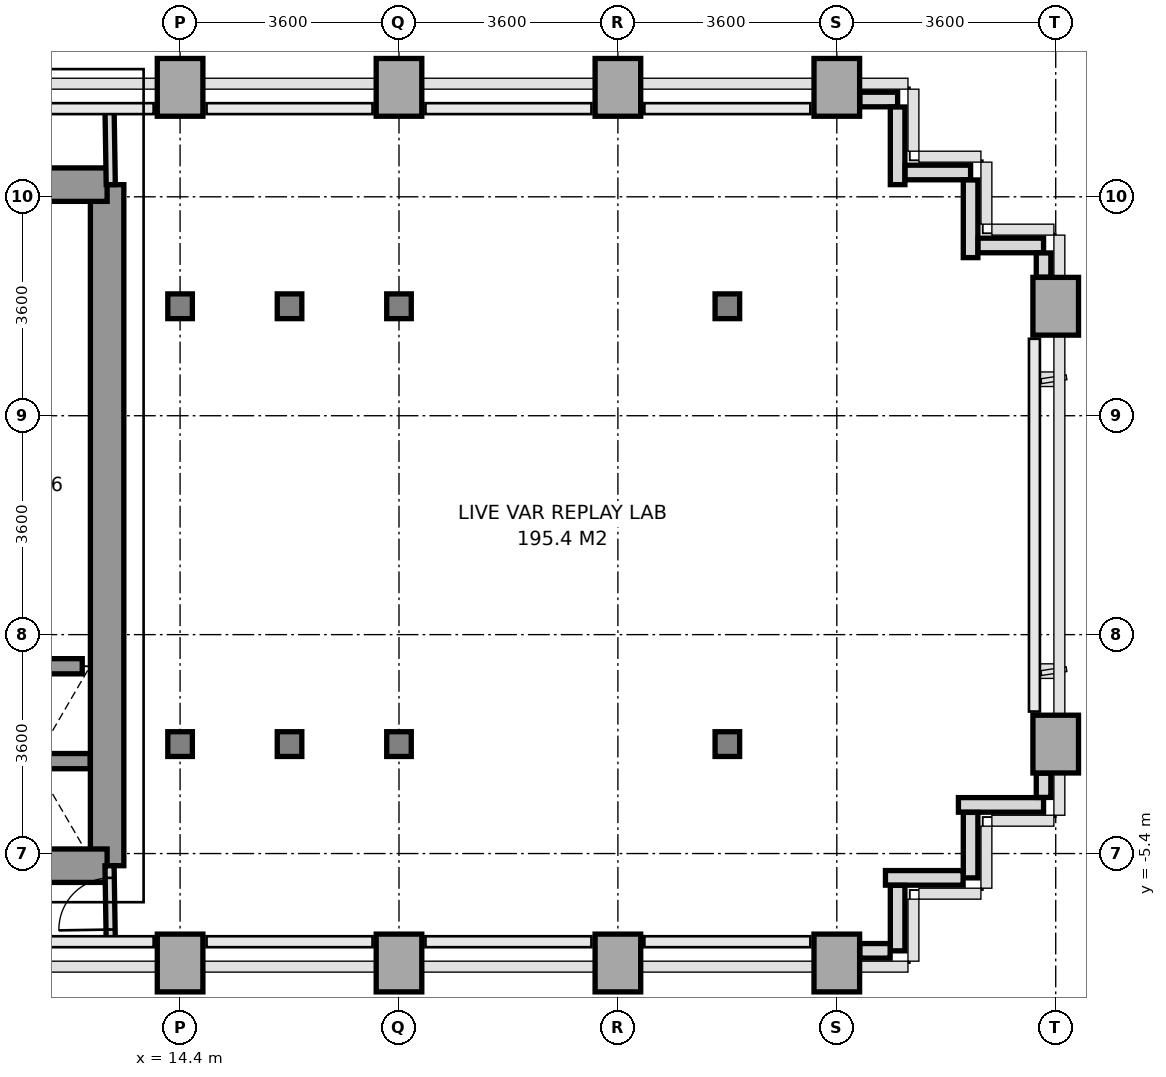
"""IFC4 building model, lengths in metres.
Left out: names, types, materials, properties, quantities, classifications, styles, units other than length and angle.
Written with IfcOpenShell. Run it as: python <this file> out.ifc"""

import sys

from ifc_helpers import new_model, si_unit, direction, frame, frame_2d, origin, origin_2d, place, context, subcontext, project, spatial, rectangle, i_section, extrude, source, transform, mapped, element, fill, save


model = new_model("IFC4")
c1 = context("Model", 3, precision=1e-05, world=origin(), true_north=direction((0.0, 1.0)))
c2 = subcontext(c1, "Body", "Model", "MODEL_VIEW")
j1 = project(units=[si_unit("LENGTHUNIT", "METRE"), si_unit("PLANEANGLEUNIT", "RADIAN")], contexts=[c1])
p1 = place(None, origin())
s1 = spatial("IfcSite", under=j1, at=p1, CompositionType="ELEMENT")
p2 = place(p1, origin())
s2 = spatial("IfcBuilding", under=s1, at=p2, CompositionType="ELEMENT")
p3 = place(p2, frame((0.0, 0.0, 78.2)))
s3 = spatial("IfcBuildingStorey", under=s2, at=p3, CompositionType="ELEMENT", Elevation=78.2)
m1 = source(origin(), c2, "Body", "SweptSolid", [
    extrude(rectangle(XDim=0.75, YDim=0.95, at=origin_2d()), origin(), (0.0, 0.0, 1.0), 3.2),
])
p4 = place(p3, frame((14.4, -7.2, 0.0), z_axis=(0.0, 0.0, 1.0), x_axis=(1.0, 0.0, 0.0)))
e1 = element("IfcColumn", 1, at=p4, inside=s3, PredefinedType="COLUMN", context=c2, shape_type="MappedRepresentation", body=[
    mapped(m1, transform((0.0, 0.0, 0.0), x_axis=(1.0, 0.0, 0.0), y_axis=(0.0, 1.0, 0.0), z_axis=(0.0, 0.0, 1.0), scale=1.0)),
])
m2 = source(origin(), c2, "Body", "SweptSolid", [
    extrude(i_section(OverallWidth=0.404, OverallDepth=0.407, WebThickness=0.022, FlangeThickness=0.035, at=origin_2d()), origin(), (0.0, 0.0, 1.0), 3.2),
])
for number, where, z_axis, x_axis in (
    (2, (14.4, -3.6, 0.0), (0.0, 0.0, 1.0), (1.0, 0.0, 0.0)),
    (3, (14.4, 3.6, 0.0), (0.0, 0.0, 1.0), (1.0, 0.0, 0.0)),
):
    element("IfcColumn", number, at=place(p3, frame(where, z_axis=z_axis, x_axis=x_axis)), inside=s3, PredefinedType="COLUMN", context=c2, shape_type="MappedRepresentation", body=[
        mapped(m2, transform((0.0, 0.0, 0.0), x_axis=(1.0, 0.0, 0.0), y_axis=(0.0, 1.0, 0.0), z_axis=(0.0, 0.0, 1.0), scale=1.0)),
    ])
p5 = place(p3, frame((14.4, 7.2, 0.0), z_axis=(0.0, 0.0, 1.0), x_axis=(1.0, 0.0, 0.0)))
e4 = element("IfcColumn", 4, at=p5, inside=s3, PredefinedType="COLUMN", context=c2, shape_type="MappedRepresentation", body=[
    mapped(m1, transform((0.0, 0.0, 0.0), x_axis=(1.0, 0.0, 0.0), y_axis=(0.0, 1.0, 0.0), z_axis=(0.0, 0.0, 1.0), scale=1.0)),
])
for number, where, z_axis, x_axis in (
    (5, (16.2, -3.6, 0.0), (0.0, 0.0, 1.0), (1.0, 0.0, 0.0)),
    (6, (16.2, 3.6, 0.0), (0.0, 0.0, 1.0), (1.0, 0.0, 0.0)),
):
    element("IfcColumn", number, at=place(p3, frame(where, z_axis=z_axis, x_axis=x_axis)), inside=s3, PredefinedType="COLUMN", context=c2, shape_type="MappedRepresentation", body=[
        mapped(m2, transform((0.0, 0.0, 0.0), x_axis=(1.0, 0.0, 0.0), y_axis=(0.0, 1.0, 0.0), z_axis=(0.0, 0.0, 1.0), scale=1.0)),
    ])
p6 = place(p3, frame((18.0, -7.2, 0.0), z_axis=(0.0, 0.0, 1.0), x_axis=(1.0, 0.0, 0.0)))
e7 = element("IfcColumn", 7, at=p6, inside=s3, PredefinedType="COLUMN", context=c2, shape_type="MappedRepresentation", body=[
    mapped(m1, transform((0.0, 0.0, 0.0), x_axis=(1.0, 0.0, 0.0), y_axis=(0.0, 1.0, 0.0), z_axis=(0.0, 0.0, 1.0), scale=1.0)),
])
for number, where, z_axis, x_axis in (
    (8, (18.0, -3.6, 0.0), (0.0, 0.0, 1.0), (1.0, 0.0, 0.0)),
    (9, (18.0, 3.6, 0.0), (0.0, 0.0, 1.0), (1.0, 0.0, 0.0)),
):
    element("IfcColumn", number, at=place(p3, frame(where, z_axis=z_axis, x_axis=x_axis)), inside=s3, PredefinedType="COLUMN", context=c2, shape_type="MappedRepresentation", body=[
        mapped(m2, transform((0.0, 0.0, 0.0), x_axis=(1.0, 0.0, 0.0), y_axis=(0.0, 1.0, 0.0), z_axis=(0.0, 0.0, 1.0), scale=1.0)),
    ])
for number, where, z_axis, x_axis in (
    (10, (18.0, 7.2, 0.0), (0.0, 0.0, 1.0), (1.0, 0.0, 0.0)),
    (11, (21.6, -7.2, 0.0), (0.0, 0.0, 1.0), (1.0, 0.0, 0.0)),
    (12, (21.6, 7.2, 0.0), (0.0, 0.0, 1.0), (1.0, 0.0, 0.0)),
):
    element("IfcColumn", number, at=place(p3, frame(where, z_axis=z_axis, x_axis=x_axis)), inside=s3, PredefinedType="COLUMN", context=c2, shape_type="MappedRepresentation", body=[
        mapped(m1, transform((0.0, 0.0, 0.0), x_axis=(1.0, 0.0, 0.0), y_axis=(0.0, 1.0, 0.0), z_axis=(0.0, 0.0, 1.0), scale=1.0)),
    ])
for number, where, z_axis, x_axis in (
    (13, (23.4, -3.6, 0.0), (0.0, 0.0, 1.0), (1.0, 0.0, 0.0)),
    (14, (23.4, 3.6, 0.0), (0.0, 0.0, 1.0), (1.0, 0.0, 0.0)),
):
    element("IfcColumn", number, at=place(p3, frame(where, z_axis=z_axis, x_axis=x_axis)), inside=s3, PredefinedType="COLUMN", context=c2, shape_type="MappedRepresentation", body=[
        mapped(m2, transform((0.0, 0.0, 0.0), x_axis=(1.0, 0.0, 0.0), y_axis=(0.0, 1.0, 0.0), z_axis=(0.0, 0.0, 1.0), scale=1.0)),
    ])
for number, where, z_axis, x_axis in (
    (15, (25.2, -7.2, 0.0), (0.0, 0.0, 1.0), (1.0, 0.0, 0.0)),
    (16, (25.2, 7.2, 0.0), (0.0, 0.0, 1.0), (1.0, 0.0, 0.0)),
    (17, (28.8, -3.6, 0.0), (0.0, 0.0, 1.0), (1.0, 0.0, 0.0)),
    (18, (28.8, 3.6, 0.0), (0.0, 0.0, 1.0), (1.0, 0.0, 0.0)),
):
    element("IfcColumn", number, at=place(p3, frame(where, z_axis=z_axis, x_axis=x_axis)), inside=s3, PredefinedType="COLUMN", context=c2, shape_type="MappedRepresentation", body=[
        mapped(m1, transform((0.0, 0.0, 0.0), x_axis=(1.0, 0.0, 0.0), y_axis=(0.0, 1.0, 0.0), z_axis=(0.0, 0.0, 1.0), scale=1.0)),
    ])
p7 = place(p3, frame((28.6, -4.6, 0.0), z_axis=(0.0, 0.0, 1.0), x_axis=(-1.0, 0.0, 0.0)))
e19 = element("IfcWall", 19, at=p7, inside=s3, PredefinedType="PARAPET", context=c2, shape_type="SweptSolid", body=[
    extrude(rectangle(XDim=1.4, YDim=0.24, at=frame_2d((0.7, 0.0))), origin(), (0.0, 0.0, 1.0), 1.15),
])
p8 = place(p3, frame((27.4, -4.723, 0.0), z_axis=(0.0, 0.0, 1.0), x_axis=(0.0, -1.0, 0.0)))
e20 = element("IfcWall", 20, at=p8, inside=s3, PredefinedType="PARAPET", context=c2, shape_type="SweptSolid", body=[
    extrude(rectangle(XDim=1.077, YDim=0.24, at=frame_2d((0.539, 0.0))), origin(), (0.0, 0.0, 1.0), 1.15),
])
p9 = place(p3, frame((27.277, -5.8, 0.0), z_axis=(0.0, 0.0, 1.0), x_axis=(-1.0, 0.0, 0.0)))
e21 = element("IfcWall", 21, at=p9, inside=s3, PredefinedType="PARAPET", context=c2, shape_type="SweptSolid", body=[
    extrude(rectangle(XDim=1.277, YDim=0.24, at=frame_2d((0.639, 0.0))), origin(), (0.0, 0.0, 1.0), 1.15),
])
p10 = place(p3, frame((26.2, -5.923, 0.0), z_axis=(0.0, 0.0, 1.0), x_axis=(0.0, -1.0, 0.0)))
e22 = element("IfcWall", 22, at=p10, inside=s3, PredefinedType="PARAPET", context=c2, shape_type="SweptSolid", body=[
    extrude(rectangle(XDim=1.077, YDim=0.24, at=frame_2d((0.539, 0.0))), origin(), (0.0, 0.0, 1.0), 1.15),
])
p11 = place(p3, frame((26.077, -7.0, 0.0), z_axis=(0.0, 0.0, 1.0), x_axis=(-1.0, 0.0, 0.0)))
e23 = element("IfcWall", 23, at=p11, inside=s3, PredefinedType="PARAPET", context=c2, shape_type="SweptSolid", body=[
    extrude(rectangle(XDim=0.499, YDim=0.24, at=frame_2d((0.25, 0.0))), origin(), (0.0, 0.0, 1.0), 1.15),
])
p12 = place(p3, frame((25.578, 7.0, 0.0), z_axis=(0.0, 0.0, 1.0), x_axis=(1.0, 0.0, 0.0)))
e24 = element("IfcWall", 24, at=p12, inside=s3, PredefinedType="PARAPET", context=c2, shape_type="SweptSolid", body=[
    extrude(rectangle(XDim=0.622, YDim=0.24, at=frame_2d((0.311, 0.0))), origin(), (0.0, 0.0, 1.0), 1.15),
])
p13 = place(p3, frame((26.2, 6.877, 0.0), z_axis=(0.0, 0.0, 1.0), x_axis=(0.0, -1.0, 0.0)))
e25 = element("IfcWall", 25, at=p13, inside=s3, PredefinedType="PARAPET", context=c2, shape_type="SweptSolid", body=[
    extrude(rectangle(XDim=1.277, YDim=0.24, at=frame_2d((0.638, 0.0))), origin(), (0.0, 0.0, 1.0), 1.15),
])
p14 = place(p3, frame((26.323, 5.8, 0.0), z_axis=(0.0, 0.0, 1.0), x_axis=(1.0, 0.0, 0.0)))
e26 = element("IfcWall", 26, at=p14, inside=s3, PredefinedType="PARAPET", context=c2, shape_type="SweptSolid", body=[
    extrude(rectangle(XDim=1.077, YDim=0.24, at=frame_2d((0.539, 0.0))), origin(), (0.0, 0.0, 1.0), 1.15),
])
p15 = place(p3, frame((27.4, 5.677, 0.0), z_axis=(0.0, 0.0, 1.0), x_axis=(0.0, -1.0, 0.0)))
e27 = element("IfcWall", 27, at=p15, inside=s3, PredefinedType="PARAPET", context=c2, shape_type="SweptSolid", body=[
    extrude(rectangle(XDim=1.277, YDim=0.24, at=frame_2d((0.639, 0.0))), origin(), (0.0, 0.0, 1.0), 1.15),
])
p16 = place(p3, frame((27.523, 4.6, 0.0), z_axis=(0.0, 0.0, 1.0), x_axis=(1.0, 0.0, 0.0)))
e28 = element("IfcWall", 28, at=p16, inside=s3, PredefinedType="PARAPET", context=c2, shape_type="SweptSolid", body=[
    extrude(rectangle(XDim=1.077, YDim=0.24, at=frame_2d((0.539, 0.0))), origin(), (0.0, 0.0, 1.0), 1.15),
])
for number, where, z_axis, x_axis in (
    (29, (28.6, 4.477, 0.0), (0.0, 0.0, 1.0), (0.0, -1.0, 0.0)),
    (30, (28.6, -4.078, 0.0), (0.0, 0.0, 1.0), (0.0, -1.0, 0.0)),
):
    element("IfcWall", number, at=place(p3, frame(where, z_axis=z_axis, x_axis=x_axis)), inside=s3, PredefinedType="PARAPET", context=c2, shape_type="SweptSolid", body=[
        extrude(rectangle(XDim=0.399, YDim=0.24, at=frame_2d((0.2, 0.0))), origin(), (0.0, 0.0, 1.0), 1.15),
    ])
p17 = place(p3, frame((13.2, -5.6, 0.0), z_axis=(0.0, 0.0, 1.0), x_axis=(0.0, 1.0, 0.0)))
e31 = element("IfcWall", 31, at=p17, inside=s3, PredefinedType="SHEAR", context=c2, shape_type="SweptSolid", body=[
    extrude(rectangle(XDim=11.2, YDim=0.55, at=frame_2d((5.6, 0.0))), origin(), (0.0, 0.0, 1.0), 3.2),
])
p18 = place(p3, frame((11.381, 5.6, 0.0), z_axis=(0.0, 0.0, 1.0), x_axis=(1.0, 0.0, 0.0)))
e32 = element("IfcWall", 32, at=p18, inside=s3, PredefinedType="SHEAR", context=c2, shape_type="SweptSolid", body=[
    extrude(rectangle(XDim=1.819, YDim=0.55, at=frame_2d((0.909, 0.0))), origin(), (0.0, 0.0, 1.0), 3.2),
])
p19 = place(p3, frame((5.4, -5.6, 0.0), z_axis=(0.0, 0.0, 1.0), x_axis=(1.0, 0.0, 0.0)))
e33 = element("IfcWall", 33, at=p19, inside=s3, PredefinedType="SHEAR", context=c2, shape_type="SweptSolid", body=[
    extrude(rectangle(XDim=7.8, YDim=0.55, at=frame_2d((3.9, 0.0))), origin(), (0.0, 0.0, 1.0), 3.2),
])
p20 = place(p19, frame((3.0, 0.0, 0.0)))
e34 = element("IfcOpeningElement", 34, at=p20, cuts=e33, PredefinedType="OPENING", context=c2, shape_type="SweptSolid", body=[
    extrude(rectangle(XDim=1.2, YDim=2.2, at=frame_2d((0.6, 1.1))), frame((0.0, 0.285, 0.0), z_axis=(0.0, -1.0, 0.0), x_axis=(1.0, 0.0, 0.0)), (0.0, 0.0, 1.0), 0.57),
])
p21 = place(p3, frame((11.08, -3.88, 0.0), z_axis=(0.0, 0.0, 1.0), x_axis=(1.0, 0.0, 0.0)))
e35 = element("IfcWall", 35, at=p21, inside=s3, PredefinedType="SOLIDWALL", context=c2, shape_type="SweptSolid", body=[
    extrude(rectangle(XDim=1.84, YDim=0.25, at=frame_2d((0.92, 0.0))), origin(), (0.0, 0.0, 1.0), 3.2),
])
p22 = place(p3, frame((11.209, -2.32, 0.0), z_axis=(0.0, 0.0, 1.0), x_axis=(1.0, 0.0, 0.0)))
e36 = element("IfcWall", 36, at=p22, inside=s3, PredefinedType="SOLIDWALL", context=c2, shape_type="SweptSolid", body=[
    extrude(rectangle(XDim=1.582, YDim=0.25, at=frame_2d((0.791, 0.0))), origin(), (0.0, 0.0, 1.0), 3.2),
])
p23 = place(p3, frame((13.26, 5.6, 0.0), z_axis=(0.0, 0.0, 1.0), x_axis=(-0.016013571389, 0.999871774545, 0.0)))
e37 = element("IfcWall", 37, at=p23, inside=s3, PredefinedType="PARTITIONING", context=c2, shape_type="SweptSolid", body=[
    extrude(rectangle(XDim=1.25, YDim=0.15, at=frame_2d((0.625, 0.0))), origin(), (0.0, 0.0, 1.0), 3.2),
])
p24 = place(p3, frame((13.26, -6.85, 0.0), z_axis=(0.0, 0.0, 1.0), x_axis=(-0.016013571389, 0.999871774545, 0.0)))
e38 = element("IfcWall", 38, at=p24, inside=s3, PredefinedType="PARTITIONING", context=c2, shape_type="SweptSolid", body=[
    extrude(rectangle(XDim=1.25, YDim=0.15, at=frame_2d((0.625, 0.0))), origin(), (0.0, 0.0, 1.0), 3.2),
])
p25 = place(p24, frame((0.2, 0.0, 0.0)))
e39 = element("IfcOpeningElement", 39, at=p25, cuts=e38, PredefinedType="OPENING", context=c2, shape_type="SweptSolid", body=[
    extrude(rectangle(XDim=0.85, YDim=2.1, at=frame_2d((0.425, 1.05))), frame((0.0, 0.085, 0.0), z_axis=(0.0, -1.0, 0.0), x_axis=(1.0, 0.0, 0.0)), (0.0, 0.0, 1.0), 0.17),
])
m3 = source(origin(), c2, "Body", "SweptSolid", [
    extrude(rectangle(XDim=0.85, YDim=2.1, at=frame_2d((0.425, 1.05))), frame((0.0, 0.025, 0.0), z_axis=(0.0, -1.0, 0.0), x_axis=(1.0, 0.0, 0.0)), (0.0, 0.0, 1.0), 0.05),
])
p26 = place(p25, origin())
e40 = element("IfcDoor", 40, at=p26, inside=s3, OperationType="SINGLE_SWING_LEFT", PredefinedType="DOOR", context=c2, shape_type="MappedRepresentation", body=[
    mapped(m3, transform((0.0, 0.0, 0.0), x_axis=(1.0, 0.0, 0.0), y_axis=(0.0, 1.0, 0.0), z_axis=(0.0, 0.0, 1.0), scale=1.0)),
])
fill(e39, e40)
save(model, sys.argv[1])
